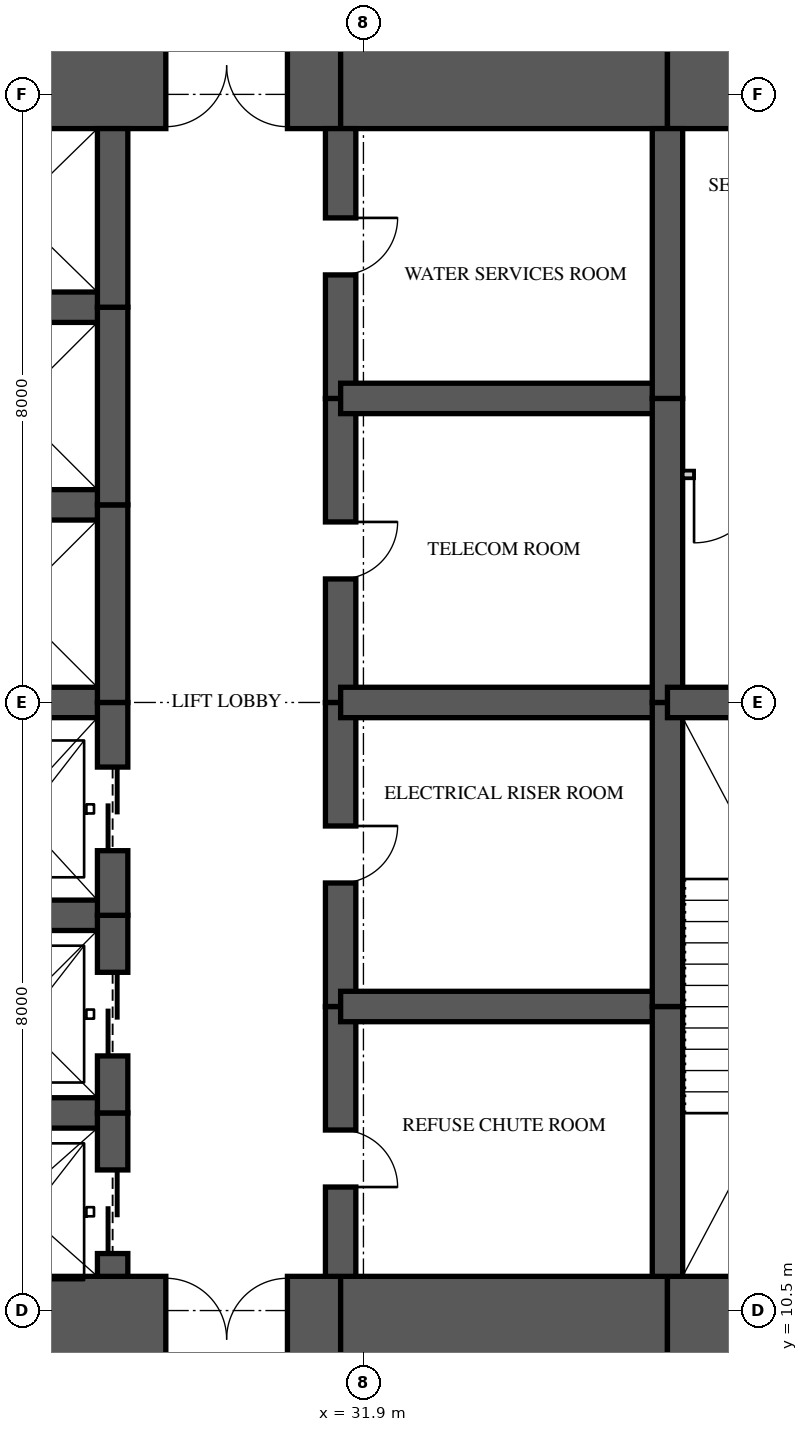
"""IFC4 building model, lengths in metres.
Left out: names, types, materials, properties, quantities, classifications, styles, units other than length and angle.
Written with IfcOpenShell. Run it as: python <this file> out.ifc"""

import sys

from ifc_helpers import new_model, si_unit, direction, frame, frame_2d, origin, place, context, subcontext, project, spatial, rectangle, extrude, element, fill, save


model = new_model("IFC4")
c1 = context("Model", 3, precision=1e-05, world=origin(), true_north=direction((0.0, 1.0)))
c2 = subcontext(c1, "Body", "Model", "MODEL_VIEW")
j1 = project(units=[si_unit("LENGTHUNIT", "METRE"), si_unit("PLANEANGLEUNIT", "RADIAN")], contexts=[c1])
p1 = place(None, origin())
s1 = spatial("IfcSite", under=j1, at=p1, CompositionType="ELEMENT")
p2 = place(p1, origin())
s2 = spatial("IfcBuilding", under=s1, at=p2, CompositionType="ELEMENT")
p3 = place(p2, frame((0.0, 0.0, 27.7)))
s3 = spatial("IfcBuildingStorey", under=s2, at=p3, CompositionType="ELEMENT", Elevation=27.7)
p4 = place(p3, frame((26.0, 10.125, 0.0), z_axis=(0.0, 0.0, 1.0), x_axis=(1.0, 0.0, 0.0)))
e1 = element("IfcWall", 1, at=p4, inside=s3, PredefinedType="SHEAR", context=c2, shape_type="SweptSolid", body=[
    extrude(rectangle(XDim=5.6, YDim=1.65, at=frame_2d((2.8, 0.0))), origin(), (0.0, 0.0, 1.0), 3.35),
])
p5 = place(p4, frame((3.3, 0.0, 0.0)))
e2 = element("IfcOpeningElement", 2, at=p5, cuts=e1, PredefinedType="OPENING", context=c2, shape_type="SweptSolid", body=[
    extrude(rectangle(XDim=1.6, YDim=2.1, at=frame_2d((0.8, 1.05))), frame((0.0, 0.835, 0.0), z_axis=(0.0, -1.0, 0.0), x_axis=(1.0, 0.0, 0.0)), (0.0, 0.0, 1.0), 1.67),
])
p6 = place(p3, frame((31.6, 10.125, 0.0), z_axis=(0.0, 0.0, 1.0), x_axis=(1.0, 0.0, 0.0)))
e3 = element("IfcWall", 3, at=p6, inside=s3, PredefinedType="SHEAR", context=c2, shape_type="SweptSolid", body=[
    extrude(rectangle(XDim=4.3, YDim=1.65, at=frame_2d((2.15, 0.0))), origin(), (0.0, 0.0, 1.0), 3.35),
])
p7 = place(p3, frame((35.9, 10.125, 0.0), z_axis=(0.0, 0.0, 1.0), x_axis=(1.0, 0.0, 0.0)))
e4 = element("IfcWall", 4, at=p7, inside=s3, PredefinedType="SHEAR", context=c2, shape_type="SweptSolid", body=[
    extrude(rectangle(XDim=8.375, YDim=1.65, at=frame_2d((4.188, 0.0))), origin(), (0.0, 0.0, 1.0), 3.35),
])
p8 = place(p7, frame((2.7, 0.0, 0.0)))
e5 = element("IfcOpeningElement", 5, at=p8, cuts=e4, PredefinedType="OPENING", context=c2, shape_type="SweptSolid", body=[
    extrude(rectangle(XDim=1.0, YDim=2.1, at=frame_2d((0.5, 1.05))), frame((0.0, 0.835, 0.0), z_axis=(0.0, -1.0, 0.0), x_axis=(1.0, 0.0, 0.0)), (0.0, 0.0, 1.0), 1.67),
])
p9 = place(p3, frame((44.275, 26.875, 0.0), z_axis=(0.0, 0.0, 1.0), x_axis=(-1.0, 0.0, 0.0)))
e6 = element("IfcWall", 6, at=p9, inside=s3, PredefinedType="SHEAR", context=c2, shape_type="SweptSolid", body=[
    extrude(rectangle(XDim=8.375, YDim=1.65, at=frame_2d((4.188, 0.0))), origin(), (0.0, 0.0, 1.0), 3.35),
])
p10 = place(p9, frame((5.775, 0.0, 0.0)))
e7 = element("IfcOpeningElement", 7, at=p10, cuts=e6, PredefinedType="OPENING", context=c2, shape_type="SweptSolid", body=[
    extrude(rectangle(XDim=0.9, YDim=2.1, at=frame_2d((0.45, 1.05))), frame((0.0, 0.835, 0.0), z_axis=(0.0, -1.0, 0.0), x_axis=(1.0, 0.0, 0.0)), (0.0, 0.0, 1.0), 1.67),
])
p11 = place(p3, frame((35.9, 26.875, 0.0), z_axis=(0.0, 0.0, 1.0), x_axis=(-1.0, 0.0, 0.0)))
e8 = element("IfcWall", 8, at=p11, inside=s3, PredefinedType="SHEAR", context=c2, shape_type="SweptSolid", body=[
    extrude(rectangle(XDim=4.3, YDim=1.65, at=frame_2d((2.15, 0.0))), origin(), (0.0, 0.0, 1.0), 3.35),
])
p12 = place(p3, frame((31.6, 26.875, 0.0), z_axis=(0.0, 0.0, 1.0), x_axis=(-1.0, 0.0, 0.0)))
e9 = element("IfcWall", 9, at=p12, inside=s3, PredefinedType="SHEAR", context=c2, shape_type="SweptSolid", body=[
    extrude(rectangle(XDim=5.6, YDim=1.65, at=frame_2d((2.8, 0.0))), origin(), (0.0, 0.0, 1.0), 3.35),
])
p13 = place(p12, frame((0.7, 0.0, 0.0)))
e10 = element("IfcOpeningElement", 10, at=p13, cuts=e9, PredefinedType="OPENING", context=c2, shape_type="SweptSolid", body=[
    extrude(rectangle(XDim=1.6, YDim=2.1, at=frame_2d((0.8, 1.05))), frame((0.0, 0.835, 0.0), z_axis=(0.0, -1.0, 0.0), x_axis=(1.0, 0.0, 0.0)), (0.0, 0.0, 1.0), 1.67),
])
p14 = place(p3, frame((28.6, 10.95, 0.0), z_axis=(0.0, 0.0, 1.0), x_axis=(0.0, 1.0, 0.0)))
e11 = element("IfcWall", 11, at=p14, inside=s3, PredefinedType="SHEAR", context=c2, shape_type="SweptSolid", body=[
    extrude(rectangle(XDim=2.15, YDim=0.4, at=frame_2d((1.075, 0.0))), origin(), (0.0, 0.0, 1.0), 3.35),
])
p15 = place(p14, frame((0.3, 0.0, 0.0)))
e12 = element("IfcOpeningElement", 12, at=p15, cuts=e11, PredefinedType="OPENING", context=c2, shape_type="SweptSolid", body=[
    extrude(rectangle(XDim=1.1, YDim=2.1, at=frame_2d((0.55, 1.05))), frame((0.0, 0.21, 0.0), z_axis=(0.0, -1.0, 0.0), x_axis=(1.0, 0.0, 0.0)), (0.0, 0.0, 1.0), 0.42),
])
p16 = place(p3, frame((28.6, 13.1, 0.0), z_axis=(0.0, 0.0, 1.0), x_axis=(0.0, 1.0, 0.0)))
e13 = element("IfcWall", 13, at=p16, inside=s3, PredefinedType="SHEAR", context=c2, shape_type="SweptSolid", body=[
    extrude(rectangle(XDim=2.6, YDim=0.4, at=frame_2d((1.3, 0.0))), origin(), (0.0, 0.0, 1.0), 3.35),
])
p17 = place(p16, frame((0.75, 0.0, 0.0)))
e14 = element("IfcOpeningElement", 14, at=p17, cuts=e13, PredefinedType="OPENING", context=c2, shape_type="SweptSolid", body=[
    extrude(rectangle(XDim=1.1, YDim=2.1, at=frame_2d((0.55, 1.05))), frame((0.0, 0.21, 0.0), z_axis=(0.0, -1.0, 0.0), x_axis=(1.0, 0.0, 0.0)), (0.0, 0.0, 1.0), 0.42),
])
p18 = place(p3, frame((28.6, 15.7, 0.0), z_axis=(0.0, 0.0, 1.0), x_axis=(0.0, 1.0, 0.0)))
e15 = element("IfcWall", 15, at=p18, inside=s3, PredefinedType="SHEAR", context=c2, shape_type="SweptSolid", body=[
    extrude(rectangle(XDim=2.8, YDim=0.4, at=frame_2d((1.4, 0.0))), origin(), (0.0, 0.0, 1.0), 3.35),
])
p19 = place(p18, frame((0.85, 0.0, 0.0)))
e16 = element("IfcOpeningElement", 16, at=p19, cuts=e15, PredefinedType="OPENING", context=c2, shape_type="SweptSolid", body=[
    extrude(rectangle(XDim=1.1, YDim=2.1, at=frame_2d((0.55, 1.05))), frame((0.0, 0.21, 0.0), z_axis=(0.0, -1.0, 0.0), x_axis=(1.0, 0.0, 0.0)), (0.0, 0.0, 1.0), 0.42),
])
p20 = place(p3, frame((28.6, 18.5, 0.0), z_axis=(0.0, 0.0, 1.0), x_axis=(0.0, 1.0, 0.0)))
e17 = element("IfcWall", 17, at=p20, inside=s3, PredefinedType="SHEAR", context=c2, shape_type="SweptSolid", body=[
    extrude(rectangle(XDim=2.6, YDim=0.4, at=frame_2d((1.3, 0.0))), origin(), (0.0, 0.0, 1.0), 3.35),
])
p21 = place(p3, frame((28.6, 21.1, 0.0), z_axis=(0.0, 0.0, 1.0), x_axis=(0.0, 1.0, 0.0)))
e18 = element("IfcWall", 18, at=p21, inside=s3, PredefinedType="SHEAR", context=c2, shape_type="SweptSolid", body=[
    extrude(rectangle(XDim=2.6, YDim=0.4, at=frame_2d((1.3, 0.0))), origin(), (0.0, 0.0, 1.0), 3.35),
])
p22 = place(p3, frame((28.6, 23.7, 0.0), z_axis=(0.0, 0.0, 1.0), x_axis=(0.0, 1.0, 0.0)))
e19 = element("IfcWall", 19, at=p22, inside=s3, PredefinedType="SHEAR", context=c2, shape_type="SweptSolid", body=[
    extrude(rectangle(XDim=2.35, YDim=0.4, at=frame_2d((1.175, 0.0))), origin(), (0.0, 0.0, 1.0), 3.35),
])
p23 = place(p3, frame((31.6, 10.95, 0.0), z_axis=(0.0, 0.0, 1.0), x_axis=(0.0, 1.0, 0.0)))
e20 = element("IfcWall", 20, at=p23, inside=s3, PredefinedType="SHEAR", context=c2, shape_type="SweptSolid", body=[
    extrude(rectangle(XDim=3.55, YDim=0.4, at=frame_2d((1.775, 0.0))), origin(), (0.0, 0.0, 1.0), 3.35),
])
p24 = place(p23, frame((1.175, 0.0, 0.0)))
e21 = element("IfcOpeningElement", 21, at=p24, cuts=e20, PredefinedType="OPENING", context=c2, shape_type="SweptSolid", body=[
    extrude(rectangle(XDim=0.75, YDim=2.1, at=frame_2d((0.375, 1.05))), frame((0.0, 0.21, 0.0), z_axis=(0.0, -1.0, 0.0), x_axis=(1.0, 0.0, 0.0)), (0.0, 0.0, 1.0), 0.42),
])
p25 = place(p3, frame((31.6, 14.5, 0.0), z_axis=(0.0, 0.0, 1.0), x_axis=(0.0, 1.0, 0.0)))
e22 = element("IfcWall", 22, at=p25, inside=s3, PredefinedType="SHEAR", context=c2, shape_type="SweptSolid", body=[
    extrude(rectangle(XDim=4.0, YDim=0.4, at=frame_2d((2.0, 0.0))), origin(), (0.0, 0.0, 1.0), 3.35),
])
p26 = place(p25, frame((1.625, 0.0, 0.0)))
e23 = element("IfcOpeningElement", 23, at=p26, cuts=e22, PredefinedType="OPENING", context=c2, shape_type="SweptSolid", body=[
    extrude(rectangle(XDim=0.75, YDim=2.1, at=frame_2d((0.375, 1.05))), frame((0.0, 0.21, 0.0), z_axis=(0.0, -1.0, 0.0), x_axis=(1.0, 0.0, 0.0)), (0.0, 0.0, 1.0), 0.42),
])
p27 = place(p3, frame((31.6, 18.5, 0.0), z_axis=(0.0, 0.0, 1.0), x_axis=(0.0, 1.0, 0.0)))
e24 = element("IfcWall", 24, at=p27, inside=s3, PredefinedType="SHEAR", context=c2, shape_type="SweptSolid", body=[
    extrude(rectangle(XDim=4.0, YDim=0.4, at=frame_2d((2.0, 0.0))), origin(), (0.0, 0.0, 1.0), 3.35),
])
p28 = place(p27, frame((1.625, 0.0, 0.0)))
e25 = element("IfcOpeningElement", 25, at=p28, cuts=e24, PredefinedType="OPENING", context=c2, shape_type="SweptSolid", body=[
    extrude(rectangle(XDim=0.75, YDim=2.1, at=frame_2d((0.375, 1.05))), frame((0.0, 0.21, 0.0), z_axis=(0.0, -1.0, 0.0), x_axis=(1.0, 0.0, 0.0)), (0.0, 0.0, 1.0), 0.42),
])
p29 = place(p3, frame((31.6, 22.5, 0.0), z_axis=(0.0, 0.0, 1.0), x_axis=(0.0, 1.0, 0.0)))
e26 = element("IfcWall", 26, at=p29, inside=s3, PredefinedType="SHEAR", context=c2, shape_type="SweptSolid", body=[
    extrude(rectangle(XDim=3.55, YDim=0.4, at=frame_2d((1.775, 0.0))), origin(), (0.0, 0.0, 1.0), 3.35),
])
p30 = place(p29, frame((1.625, 0.0, 0.0)))
e27 = element("IfcOpeningElement", 27, at=p30, cuts=e26, PredefinedType="OPENING", context=c2, shape_type="SweptSolid", body=[
    extrude(rectangle(XDim=0.75, YDim=2.1, at=frame_2d((0.375, 1.05))), frame((0.0, 0.21, 0.0), z_axis=(0.0, -1.0, 0.0), x_axis=(1.0, 0.0, 0.0)), (0.0, 0.0, 1.0), 0.42),
])
p31 = place(p3, frame((35.9, 10.95, 0.0), z_axis=(0.0, 0.0, 1.0), x_axis=(0.0, 1.0, 0.0)))
e28 = element("IfcWall", 28, at=p31, inside=s3, PredefinedType="SHEAR", context=c2, shape_type="SweptSolid", body=[
    extrude(rectangle(XDim=3.55, YDim=0.4, at=frame_2d((1.775, 0.0))), origin(), (0.0, 0.0, 1.0), 3.35),
])
for number, where, z_axis, x_axis in (
    (29, (35.9, 14.5, 0.0), (0.0, 0.0, 1.0), (0.0, 1.0, 0.0)),
    (30, (35.9, 18.5, 0.0), (0.0, 0.0, 1.0), (0.0, 1.0, 0.0)),
):
    element("IfcWall", number, at=place(p3, frame(where, z_axis=z_axis, x_axis=x_axis)), inside=s3, PredefinedType="SHEAR", context=c2, shape_type="SweptSolid", body=[
        extrude(rectangle(XDim=4.0, YDim=0.4, at=frame_2d((2.0, 0.0))), origin(), (0.0, 0.0, 1.0), 3.35),
    ])
p32 = place(p3, frame((35.9, 22.5, 0.0), z_axis=(0.0, 0.0, 1.0), x_axis=(0.0, 1.0, 0.0)))
e31 = element("IfcWall", 31, at=p32, inside=s3, PredefinedType="SHEAR", context=c2, shape_type="SweptSolid", body=[
    extrude(rectangle(XDim=3.55, YDim=0.4, at=frame_2d((1.775, 0.0))), origin(), (0.0, 0.0, 1.0), 3.35),
])
for number, where, z_axis, x_axis in (
    (32, (26.0, 13.1, 0.0), (0.0, 0.0, 1.0), (1.0, 0.0, 0.0)),
    (33, (26.0, 15.7, 0.0), (0.0, 0.0, 1.0), (1.0, 0.0, 0.0)),
    (34, (26.0, 18.5, 0.0), (0.0, 0.0, 1.0), (1.0, 0.0, 0.0)),
    (35, (26.0, 21.1, 0.0), (0.0, 0.0, 1.0), (1.0, 0.0, 0.0)),
    (36, (26.0, 23.7, 0.0), (0.0, 0.0, 1.0), (1.0, 0.0, 0.0)),
):
    element("IfcWall", number, at=place(p3, frame(where, z_axis=z_axis, x_axis=x_axis)), inside=s3, PredefinedType="SHEAR", context=c2, shape_type="SweptSolid", body=[
        extrude(rectangle(XDim=2.6, YDim=0.4, at=frame_2d((1.3, 0.0))), origin(), (0.0, 0.0, 1.0), 3.35),
    ])
for number, where, z_axis, x_axis in (
    (37, (31.6, 14.5, 0.0), (0.0, 0.0, 1.0), (1.0, 0.0, 0.0)),
    (38, (31.6, 18.5, 0.0), (0.0, 0.0, 1.0), (1.0, 0.0, 0.0)),
    (39, (31.6, 22.5, 0.0), (0.0, 0.0, 1.0), (1.0, 0.0, 0.0)),
):
    element("IfcWall", number, at=place(p3, frame(where, z_axis=z_axis, x_axis=x_axis)), inside=s3, PredefinedType="SHEAR", context=c2, shape_type="SweptSolid", body=[
        extrude(rectangle(XDim=4.3, YDim=0.4, at=frame_2d((2.15, 0.0))), origin(), (0.0, 0.0, 1.0), 3.35),
    ])
p33 = place(p3, frame((35.9, 18.5, 0.0), z_axis=(0.0, 0.0, 1.0), x_axis=(1.0, 0.0, 0.0)))
e40 = element("IfcWall", 40, at=p33, inside=s3, PredefinedType="SHEAR", context=c2, shape_type="SweptSolid", body=[
    extrude(rectangle(XDim=4.3, YDim=0.4, at=frame_2d((2.15, 0.0))), origin(), (0.0, 0.0, 1.0), 3.35),
])
p34 = place(p3, frame((36.1, 21.5, 0.0), z_axis=(0.0, 0.0, 1.0), x_axis=(1.0, 0.0, 0.0)))
e41 = element("IfcWall", 41, at=p34, inside=s3, PredefinedType="PARTITIONING", context=c2, shape_type="SweptSolid", body=[
    extrude(rectangle(XDim=3.9, YDim=0.1, at=frame_2d((1.95, 0.0))), origin(), (0.0, 0.0, 1.0), 3.11),
])
p35 = place(p34, frame((0.15, 0.0, 0.0)))
e42 = element("IfcOpeningElement", 42, at=p35, cuts=e41, PredefinedType="OPENING", context=c2, shape_type="SweptSolid", body=[
    extrude(rectangle(XDim=0.9, YDim=2.1, at=frame_2d((0.45, 1.05))), frame((0.0, 0.06, 0.0), z_axis=(0.0, -1.0, 0.0), x_axis=(1.0, 0.0, 0.0)), (0.0, 0.0, 1.0), 0.12),
])
p36 = place(p35, frame((0.9, 0.0, 0.0), z_axis=(0.0, 0.0, 1.0), x_axis=(-1.0, 0.0, 0.0)))
e43 = element("IfcDoor", 43, at=p36, inside=s3, OperationType="SINGLE_SWING_RIGHT", PredefinedType="DOOR", context=c2, shape_type="SweptSolid", body=[
    extrude(rectangle(XDim=0.9, YDim=2.1, at=frame_2d((0.45, 1.05))), frame((0.0, 0.025, 0.0), z_axis=(0.0, -1.0, 0.0), x_axis=(1.0, 0.0, 0.0)), (0.0, 0.0, 1.0), 0.05),
])
fill(e42, e43)
p37 = place(p15, origin())
e44 = element("IfcDoor", 44, at=p37, inside=s3, OperationType="SLIDING_TO_LEFT", PredefinedType="DOOR", context=c2, shape_type="SweptSolid", body=[
    extrude(rectangle(XDim=1.1, YDim=2.1, at=frame_2d((0.55, 1.05))), frame((0.0, 0.025, 0.0), z_axis=(0.0, -1.0, 0.0), x_axis=(1.0, 0.0, 0.0)), (0.0, 0.0, 1.0), 0.05),
])
fill(e12, e44)
p38 = place(p17, origin())
e45 = element("IfcDoor", 45, at=p38, inside=s3, OperationType="SLIDING_TO_LEFT", PredefinedType="DOOR", context=c2, shape_type="SweptSolid", body=[
    extrude(rectangle(XDim=1.1, YDim=2.1, at=frame_2d((0.55, 1.05))), frame((0.0, 0.025, 0.0), z_axis=(0.0, -1.0, 0.0), x_axis=(1.0, 0.0, 0.0)), (0.0, 0.0, 1.0), 0.05),
])
fill(e14, e45)
p39 = place(p19, origin())
e46 = element("IfcDoor", 46, at=p39, inside=s3, OperationType="SLIDING_TO_LEFT", PredefinedType="DOOR", context=c2, shape_type="SweptSolid", body=[
    extrude(rectangle(XDim=1.1, YDim=2.1, at=frame_2d((0.55, 1.05))), frame((0.0, 0.025, 0.0), z_axis=(0.0, -1.0, 0.0), x_axis=(1.0, 0.0, 0.0)), (0.0, 0.0, 1.0), 0.05),
])
fill(e16, e46)
p40 = place(p5, origin())
e47 = element("IfcDoor", 47, at=p40, inside=s3, OperationType="DOUBLE_DOOR_SINGLE_SWING", PredefinedType="DOOR", context=c2, shape_type="SweptSolid", body=[
    extrude(rectangle(XDim=1.6, YDim=2.1, at=frame_2d((0.8, 1.05))), frame((0.0, 0.025, 0.0), z_axis=(0.0, -1.0, 0.0), x_axis=(1.0, 0.0, 0.0)), (0.0, 0.0, 1.0), 0.05),
])
fill(e2, e47)
p41 = place(p13, origin())
e48 = element("IfcDoor", 48, at=p41, inside=s3, OperationType="DOUBLE_DOOR_SINGLE_SWING", PredefinedType="DOOR", context=c2, shape_type="SweptSolid", body=[
    extrude(rectangle(XDim=1.6, YDim=2.1, at=frame_2d((0.8, 1.05))), frame((0.0, 0.025, 0.0), z_axis=(0.0, -1.0, 0.0), x_axis=(1.0, 0.0, 0.0)), (0.0, 0.0, 1.0), 0.05),
])
fill(e10, e48)
p42 = place(p24, frame((0.75, 0.0, 0.0), z_axis=(0.0, 0.0, 1.0), x_axis=(-1.0, 0.0, 0.0)))
e49 = element("IfcDoor", 49, at=p42, inside=s3, OperationType="SINGLE_SWING_RIGHT", PredefinedType="DOOR", context=c2, shape_type="SweptSolid", body=[
    extrude(rectangle(XDim=0.75, YDim=2.1, at=frame_2d((0.375, 1.05))), frame((0.0, 0.025, 0.0), z_axis=(0.0, -1.0, 0.0), x_axis=(1.0, 0.0, 0.0)), (0.0, 0.0, 1.0), 0.05),
])
fill(e21, e49)
p43 = place(p26, frame((0.75, 0.0, 0.0), z_axis=(0.0, 0.0, 1.0), x_axis=(-1.0, 0.0, 0.0)))
e50 = element("IfcDoor", 50, at=p43, inside=s3, OperationType="SINGLE_SWING_LEFT", PredefinedType="DOOR", context=c2, shape_type="SweptSolid", body=[
    extrude(rectangle(XDim=0.75, YDim=2.1, at=frame_2d((0.375, 1.05))), frame((0.0, 0.025, 0.0), z_axis=(0.0, -1.0, 0.0), x_axis=(1.0, 0.0, 0.0)), (0.0, 0.0, 1.0), 0.05),
])
fill(e23, e50)
p44 = place(p28, frame((0.75, 0.0, 0.0), z_axis=(0.0, 0.0, 1.0), x_axis=(-1.0, 0.0, 0.0)))
e51 = element("IfcDoor", 51, at=p44, inside=s3, OperationType="SINGLE_SWING_LEFT", PredefinedType="DOOR", context=c2, shape_type="SweptSolid", body=[
    extrude(rectangle(XDim=0.75, YDim=2.1, at=frame_2d((0.375, 1.05))), frame((0.0, 0.025, 0.0), z_axis=(0.0, -1.0, 0.0), x_axis=(1.0, 0.0, 0.0)), (0.0, 0.0, 1.0), 0.05),
])
fill(e25, e51)
p45 = place(p30, frame((0.75, 0.0, 0.0), z_axis=(0.0, 0.0, 1.0), x_axis=(-1.0, 0.0, 0.0)))
e52 = element("IfcDoor", 52, at=p45, inside=s3, OperationType="SINGLE_SWING_LEFT", PredefinedType="DOOR", context=c2, shape_type="SweptSolid", body=[
    extrude(rectangle(XDim=0.75, YDim=2.1, at=frame_2d((0.375, 1.05))), frame((0.0, 0.025, 0.0), z_axis=(0.0, -1.0, 0.0), x_axis=(1.0, 0.0, 0.0)), (0.0, 0.0, 1.0), 0.05),
])
fill(e27, e52)
save(model, sys.argv[1])
